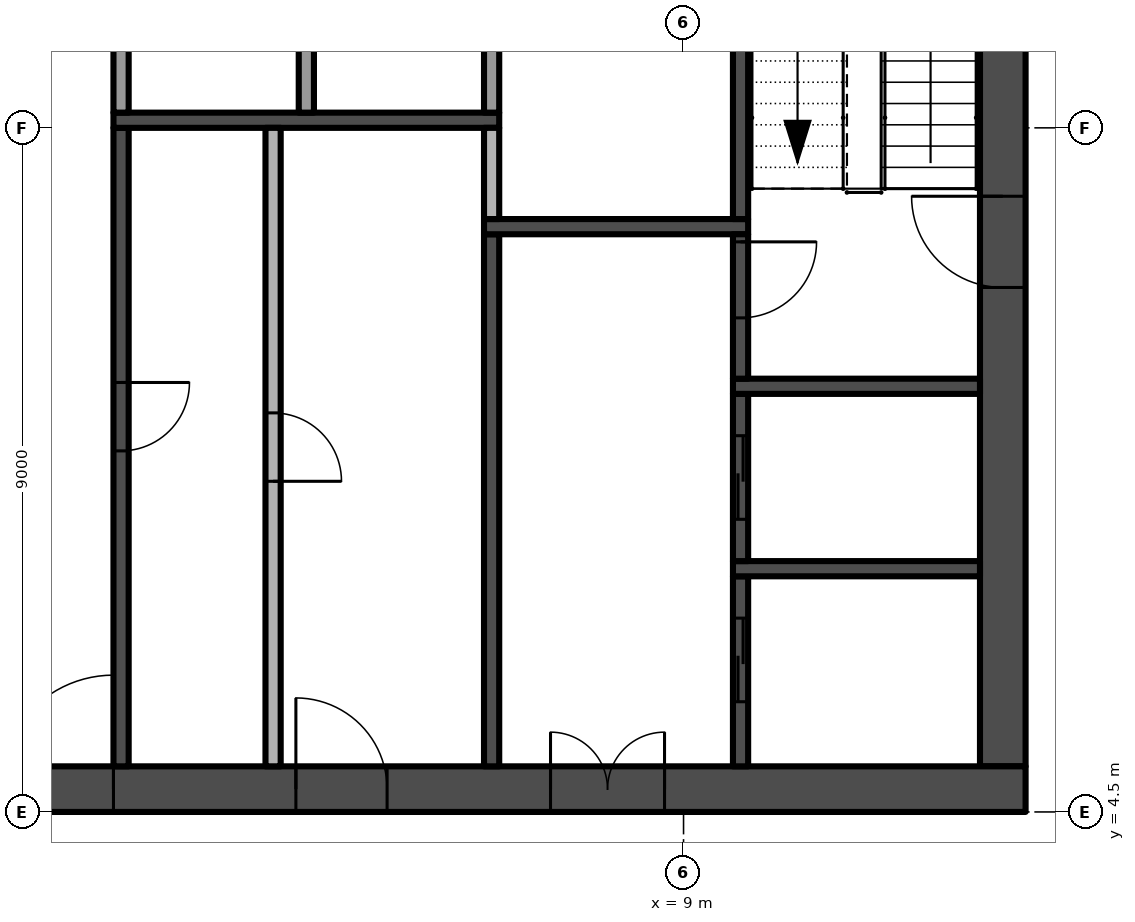
"""IFC4 building model, lengths in metres.
Left out: names, types, materials, properties, quantities, classifications, styles, units other than length and angle.
Written with IfcOpenShell. Run it as: python <this file> out.ifc"""

import sys

from ifc_helpers import new_model, si_unit, direction, frame, frame_2d, origin, place, context, subcontext, project, spatial, rectangle, extrude, element, fill, save


model = new_model("IFC4")
c1 = context("Model", 3, precision=1e-05, world=origin(), true_north=direction((0.0, 1.0)))
c2 = subcontext(c1, "Body", "Model", "MODEL_VIEW")
j1 = project(units=[si_unit("LENGTHUNIT", "METRE"), si_unit("PLANEANGLEUNIT", "RADIAN")], contexts=[c1])
p1 = place(None, origin())
s1 = spatial("IfcSite", under=j1, at=p1, CompositionType="ELEMENT")
p2 = place(p1, origin())
s2 = spatial("IfcBuilding", under=s1, at=p2, CompositionType="ELEMENT")
p3 = place(p2, frame((0.0, 0.0, 203.4)))
s3 = spatial("IfcBuildingStorey", under=s2, at=p3, CompositionType="ELEMENT", Elevation=203.4)
p4 = place(p3, frame((-13.5, 4.8, -0.3), z_axis=(0.0, 0.0, 1.0), x_axis=(1.0, 0.0, 0.0)))
e1 = element("IfcWall", 1, at=p4, inside=s3, PredefinedType="SHEAR", context=c2, shape_type="SweptSolid", body=[
    extrude(rectangle(XDim=27.0, YDim=0.6, at=frame_2d((13.5, 0.0))), origin(), (0.0, 0.0, 1.0), 3.8),
])
p5 = place(p4, frame((12.0, 0.0, 0.3)))
e2 = element("IfcOpeningElement", 2, at=p5, cuts=e1, PredefinedType="OPENING", context=c2, shape_type="SweptSolid", body=[
    extrude(rectangle(XDim=3.0, YDim=2.4, at=frame_2d((1.5, 1.2))), frame((0.0, 0.31, 0.0), z_axis=(0.0, -1.0, 0.0), x_axis=(1.0, 0.0, 0.0)), (0.0, 0.0, 1.0), 0.62),
])
p6 = place(p4, frame((4.9, 0.0, 0.3)))
e3 = element("IfcOpeningElement", 3, at=p6, cuts=e1, PredefinedType="OPENING", context=c2, shape_type="SweptSolid", body=[
    extrude(rectangle(XDim=1.2, YDim=2.2, at=frame_2d((0.6, 1.1))), frame((0.0, 0.31, 0.0), z_axis=(0.0, -1.0, 0.0), x_axis=(1.0, 0.0, 0.0)), (0.0, 0.0, 1.0), 0.62),
])
p7 = place(p4, frame((20.75, 0.0, 0.3)))
e4 = element("IfcOpeningElement", 4, at=p7, cuts=e1, PredefinedType="OPENING", context=c2, shape_type="SweptSolid", body=[
    extrude(rectangle(XDim=1.5, YDim=2.2, at=frame_2d((0.75, 1.1))), frame((0.0, 0.31, 0.0), z_axis=(0.0, -1.0, 0.0), x_axis=(1.0, 0.0, 0.0)), (0.0, 0.0, 1.0), 0.62),
])
p8 = place(p4, frame((17.4, 0.0, 0.3)))
e5 = element("IfcOpeningElement", 5, at=p8, cuts=e1, PredefinedType="OPENING", context=c2, shape_type="SweptSolid", body=[
    extrude(rectangle(XDim=1.2, YDim=2.2, at=frame_2d((0.6, 1.1))), frame((0.0, 0.31, 0.0), z_axis=(0.0, -1.0, 0.0), x_axis=(1.0, 0.0, 0.0)), (0.0, 0.0, 1.0), 0.62),
])
p9 = place(p3, frame((13.2, 5.1, -0.3), z_axis=(0.0, 0.0, 1.0), x_axis=(0.0, 1.0, 0.0)))
e6 = element("IfcWall", 6, at=p9, inside=s3, PredefinedType="SHEAR", context=c2, shape_type="SweptSolid", body=[
    extrude(rectangle(XDim=16.8, YDim=0.6, at=frame_2d((8.4, 0.0))), origin(), (0.0, 0.0, 1.0), 3.8),
])
p10 = place(p9, frame((6.3, 0.0, 0.3)))
e7 = element("IfcOpeningElement", 7, at=p10, cuts=e6, PredefinedType="OPENING", context=c2, shape_type="SweptSolid", body=[
    extrude(rectangle(XDim=1.2, YDim=2.2, at=frame_2d((0.6, 1.1))), frame((0.0, 0.31, 0.0), z_axis=(0.0, -1.0, 0.0), x_axis=(1.0, 0.0, 0.0)), (0.0, 0.0, 1.0), 0.62),
])
p11 = place(p3, frame((1.6, 13.5, 0.0), z_axis=(0.0, 0.0, 1.0), x_axis=(0.0, -1.0, 0.0)))
e8 = element("IfcWall", 8, at=p11, inside=s3, PredefinedType="SHEAR", context=c2, shape_type="SweptSolid", body=[
    extrude(rectangle(XDim=8.4, YDim=0.2, at=frame_2d((4.2, 0.0))), origin(), (0.0, 0.0, 1.0), 3.5),
])
p12 = place(p11, frame((3.35, 0.0, 0.0)))
e9 = element("IfcOpeningElement", 9, at=p12, cuts=e8, PredefinedType="OPENING", context=c2, shape_type="SweptSolid", body=[
    extrude(rectangle(XDim=0.9, YDim=2.1, at=frame_2d((0.45, 1.05))), frame((0.0, 0.11, 0.0), z_axis=(0.0, -1.0, 0.0), x_axis=(1.0, 0.0, 0.0)), (0.0, 0.0, 1.0), 0.22),
])
p13 = place(p3, frame((1.5, 13.6, 0.0), z_axis=(0.0, 0.0, 1.0), x_axis=(1.0, 0.0, 0.0)))
e10 = element("IfcWall", 10, at=p13, inside=s3, PredefinedType="SHEAR", context=c2, shape_type="SweptSolid", body=[
    extrude(rectangle(XDim=5.075, YDim=0.2, at=frame_2d((2.538, 0.0))), origin(), (0.0, 0.0, 1.0), 3.5),
])
p14 = place(p3, frame((1.6, 13.7, 0.0), z_axis=(0.0, 0.0, 1.0), x_axis=(0.0, 1.0, 0.0)))
e11 = element("IfcWall", 11, at=p14, inside=s3, PredefinedType="PARTITIONING", context=c2, shape_type="SweptSolid", body=[
    extrude(rectangle(XDim=2.2, YDim=0.2, at=frame_2d((1.1, 0.0))), origin(), (0.0, 0.0, 1.0), 3.5),
])
p15 = place(p3, frame((3.6, 13.5, 0.0), z_axis=(0.0, 0.0, 1.0), x_axis=(0.0, -1.0, 0.0)))
e12 = element("IfcWall", 12, at=p15, inside=s3, PredefinedType="PARTITIONING", context=c2, shape_type="SweptSolid", body=[
    extrude(rectangle(XDim=8.4, YDim=0.2, at=frame_2d((4.2, 0.0))), origin(), (0.0, 0.0, 1.0), 3.5),
])
p16 = place(p15, frame((3.75, 0.0, 0.0)))
e13 = element("IfcOpeningElement", 13, at=p16, cuts=e12, PredefinedType="OPENING", context=c2, shape_type="SweptSolid", body=[
    extrude(rectangle(XDim=0.9, YDim=2.1, at=frame_2d((0.45, 1.05))), frame((0.0, 0.11, 0.0), z_axis=(0.0, -1.0, 0.0), x_axis=(1.0, 0.0, 0.0)), (0.0, 0.0, 1.0), 0.22),
])
p17 = place(p3, frame((4.037, 13.7, 0.0), z_axis=(0.0, 0.0, 1.0), x_axis=(0.0, 1.0, 0.0)))
e14 = element("IfcWall", 14, at=p17, inside=s3, PredefinedType="PARTITIONING", context=c2, shape_type="SweptSolid", body=[
    extrude(rectangle(XDim=2.2, YDim=0.2, at=frame_2d((1.1, 0.0))), origin(), (0.0, 0.0, 1.0), 3.5),
])
p18 = place(p3, frame((6.475, 5.1, 0.0), z_axis=(0.0, 0.0, 1.0), x_axis=(0.0, 1.0, 0.0)))
e15 = element("IfcWall", 15, at=p18, inside=s3, PredefinedType="SHEAR", context=c2, shape_type="SweptSolid", body=[
    extrude(rectangle(XDim=7.0, YDim=0.2, at=frame_2d((3.5, 0.0))), origin(), (0.0, 0.0, 1.0), 3.5),
])
p19 = place(p3, frame((6.375, 12.2, 0.0), z_axis=(0.0, 0.0, 1.0), x_axis=(1.0, 0.0, 0.0)))
e16 = element("IfcWall", 16, at=p19, inside=s3, PredefinedType="SHEAR", context=c2, shape_type="SweptSolid", body=[
    extrude(rectangle(XDim=3.475, YDim=0.2, at=frame_2d((1.738, 0.0))), origin(), (0.0, 0.0, 1.0), 3.5),
])
p20 = place(p3, frame((6.475, 12.3, 0.0), z_axis=(0.0, 0.0, 1.0), x_axis=(0.0, 1.0, 0.0)))
e17 = element("IfcWall", 17, at=p20, inside=s3, PredefinedType="PARTITIONING", context=c2, shape_type="SweptSolid", body=[
    extrude(rectangle(XDim=1.2, YDim=0.2, at=frame_2d((0.6, 0.0))), origin(), (0.0, 0.0, 1.0), 3.5),
])
p21 = place(p3, frame((6.475, 13.7, 0.0), z_axis=(0.0, 0.0, 1.0), x_axis=(0.0, 1.0, 0.0)))
e18 = element("IfcWall", 18, at=p21, inside=s3, PredefinedType="PARTITIONING", context=c2, shape_type="SweptSolid", body=[
    extrude(rectangle(XDim=2.2, YDim=0.2, at=frame_2d((1.1, 0.0))), origin(), (0.0, 0.0, 1.0), 3.5),
])
p22 = place(p3, frame((9.75, 5.1, 0.0), z_axis=(0.0, 0.0, 1.0), x_axis=(0.0, 1.0, 0.0)))
e19 = element("IfcWall", 19, at=p22, inside=s3, PredefinedType="SHEAR", context=c2, shape_type="SweptSolid", body=[
    extrude(rectangle(XDim=2.5, YDim=0.2, at=frame_2d((1.25, 0.0))), origin(), (0.0, 0.0, 1.0), 3.5),
])
p23 = place(p22, frame((0.85, 0.0, 0.0)))
e20 = element("IfcOpeningElement", 20, at=p23, cuts=e19, PredefinedType="OPENING", context=c2, shape_type="SweptSolid", body=[
    extrude(rectangle(XDim=1.1, YDim=2.1, at=frame_2d((0.55, 1.05))), frame((0.0, 0.11, 0.0), z_axis=(0.0, -1.0, 0.0), x_axis=(1.0, 0.0, 0.0)), (0.0, 0.0, 1.0), 0.22),
])
p24 = place(p3, frame((9.65, 7.7, 0.0), z_axis=(0.0, 0.0, 1.0), x_axis=(1.0, 0.0, 0.0)))
e21 = element("IfcWall", 21, at=p24, inside=s3, PredefinedType="SHEAR", context=c2, shape_type="SweptSolid", body=[
    extrude(rectangle(XDim=3.25, YDim=0.2, at=frame_2d((1.625, 0.0))), origin(), (0.0, 0.0, 1.0), 3.5),
])
p25 = place(p3, frame((9.75, 7.8, 0.0), z_axis=(0.0, 0.0, 1.0), x_axis=(0.0, 1.0, 0.0)))
e22 = element("IfcWall", 22, at=p25, inside=s3, PredefinedType="SHEAR", context=c2, shape_type="SweptSolid", body=[
    extrude(rectangle(XDim=2.2, YDim=0.2, at=frame_2d((1.1, 0.0))), origin(), (0.0, 0.0, 1.0), 3.5),
])
p26 = place(p25, frame((0.55, 0.0, 0.0)))
e23 = element("IfcOpeningElement", 23, at=p26, cuts=e22, PredefinedType="OPENING", context=c2, shape_type="SweptSolid", body=[
    extrude(rectangle(XDim=1.1, YDim=2.1, at=frame_2d((0.55, 1.05))), frame((0.0, 0.11, 0.0), z_axis=(0.0, -1.0, 0.0), x_axis=(1.0, 0.0, 0.0)), (0.0, 0.0, 1.0), 0.22),
])
p27 = place(p3, frame((9.65, 10.1, 0.0), z_axis=(0.0, 0.0, 1.0), x_axis=(1.0, 0.0, 0.0)))
e24 = element("IfcWall", 24, at=p27, inside=s3, PredefinedType="SHEAR", context=c2, shape_type="SweptSolid", body=[
    extrude(rectangle(XDim=3.25, YDim=0.2, at=frame_2d((1.625, 0.0))), origin(), (0.0, 0.0, 1.0), 3.5),
])
p28 = place(p3, frame((9.75, 12.1, 0.0), z_axis=(0.0, 0.0, 1.0), x_axis=(0.0, -1.0, 0.0)))
e25 = element("IfcWall", 25, at=p28, inside=s3, PredefinedType="SHEAR", context=c2, shape_type="SweptSolid", body=[
    extrude(rectangle(XDim=1.9, YDim=0.2, at=frame_2d((0.95, 0.0))), origin(), (0.0, 0.0, 1.0), 3.5),
])
p29 = place(p28, frame((0.1, 0.0, 0.0)))
e26 = element("IfcOpeningElement", 26, at=p29, cuts=e25, PredefinedType="OPENING", context=c2, shape_type="SweptSolid", body=[
    extrude(rectangle(XDim=1.0, YDim=2.2, at=frame_2d((0.5, 1.1))), frame((0.0, 0.11, 0.0), z_axis=(0.0, -1.0, 0.0), x_axis=(1.0, 0.0, 0.0)), (0.0, 0.0, 1.0), 0.22),
])
p30 = place(p3, frame((9.75, 12.3, 0.0), z_axis=(0.0, 0.0, 1.0), x_axis=(0.0, 1.0, 0.0)))
e27 = element("IfcWall", 27, at=p30, inside=s3, PredefinedType="SHEAR", context=c2, shape_type="SweptSolid", body=[
    extrude(rectangle(XDim=3.6, YDim=0.2, at=frame_2d((1.8, 0.0))), origin(), (0.0, 0.0, 1.0), 3.5),
])
p31 = place(p5, frame((3.0, 0.0, 0.0), z_axis=(0.0, 0.0, 1.0), x_axis=(-1.0, 0.0, 0.0)))
e28 = element("IfcDoor", 28, at=p31, inside=s3, OperationType="DOUBLE_DOOR_SINGLE_SWING", PredefinedType="DOOR", context=c2, shape_type="SweptSolid", body=[
    extrude(rectangle(XDim=3.0, YDim=2.4, at=frame_2d((1.5, 1.2))), frame((0.0, 0.025, 0.0), z_axis=(0.0, -1.0, 0.0), x_axis=(1.0, 0.0, 0.0)), (0.0, 0.0, 1.0), 0.05),
])
fill(e2, e28)
p32 = place(p10, frame((1.2, 0.0, 0.0), z_axis=(0.0, 0.0, 1.0), x_axis=(-1.0, 0.0, 0.0)))
e29 = element("IfcDoor", 29, at=p32, inside=s3, OperationType="SINGLE_SWING_LEFT", PredefinedType="DOOR", context=c2, shape_type="SweptSolid", body=[
    extrude(rectangle(XDim=1.2, YDim=2.2, at=frame_2d((0.6, 1.1))), frame((0.0, 0.025, 0.0), z_axis=(0.0, -1.0, 0.0), x_axis=(1.0, 0.0, 0.0)), (0.0, 0.0, 1.0), 0.05),
])
fill(e7, e29)
p33 = place(p7, frame((1.5, 0.0, 0.0), z_axis=(0.0, 0.0, 1.0), x_axis=(-1.0, 0.0, 0.0)))
e30 = element("IfcDoor", 30, at=p33, inside=s3, OperationType="DOUBLE_DOOR_SINGLE_SWING", PredefinedType="DOOR", context=c2, shape_type="SweptSolid", body=[
    extrude(rectangle(XDim=1.5, YDim=2.2, at=frame_2d((0.75, 1.1))), frame((0.0, 0.025, 0.0), z_axis=(0.0, -1.0, 0.0), x_axis=(1.0, 0.0, 0.0)), (0.0, 0.0, 1.0), 0.05),
])
fill(e4, e30)
p34 = place(p8, frame((1.2, 0.0, 0.0), z_axis=(0.0, 0.0, 1.0), x_axis=(-1.0, 0.0, 0.0)))
e31 = element("IfcDoor", 31, at=p34, inside=s3, OperationType="SINGLE_SWING_RIGHT", PredefinedType="DOOR", context=c2, shape_type="SweptSolid", body=[
    extrude(rectangle(XDim=1.2, YDim=2.2, at=frame_2d((0.6, 1.1))), frame((0.0, 0.025, 0.0), z_axis=(0.0, -1.0, 0.0), x_axis=(1.0, 0.0, 0.0)), (0.0, 0.0, 1.0), 0.05),
])
fill(e5, e31)
p35 = place(p29, origin())
e32 = element("IfcDoor", 32, at=p35, inside=s3, OperationType="SINGLE_SWING_LEFT", PredefinedType="DOOR", context=c2, shape_type="SweptSolid", body=[
    extrude(rectangle(XDim=1.0, YDim=2.2, at=frame_2d((0.5, 1.1))), frame((0.0, 0.025, 0.0), z_axis=(0.0, -1.0, 0.0), x_axis=(1.0, 0.0, 0.0)), (0.0, 0.0, 1.0), 0.05),
])
fill(e26, e32)
p36 = place(p23, origin())
e33 = element("IfcDoor", 33, at=p36, inside=s3, OperationType="SLIDING_TO_RIGHT", PredefinedType="DOOR", context=c2, shape_type="SweptSolid", body=[
    extrude(rectangle(XDim=1.1, YDim=2.1, at=frame_2d((0.55, 1.05))), frame((0.0, 0.025, 0.0), z_axis=(0.0, -1.0, 0.0), x_axis=(1.0, 0.0, 0.0)), (0.0, 0.0, 1.0), 0.05),
])
fill(e20, e33)
p37 = place(p26, origin())
e34 = element("IfcDoor", 34, at=p37, inside=s3, OperationType="SLIDING_TO_RIGHT", PredefinedType="DOOR", context=c2, shape_type="SweptSolid", body=[
    extrude(rectangle(XDim=1.1, YDim=2.1, at=frame_2d((0.55, 1.05))), frame((0.0, 0.025, 0.0), z_axis=(0.0, -1.0, 0.0), x_axis=(1.0, 0.0, 0.0)), (0.0, 0.0, 1.0), 0.05),
])
fill(e23, e34)
p38 = place(p12, origin())
e35 = element("IfcDoor", 35, at=p38, inside=s3, OperationType="SINGLE_SWING_LEFT", PredefinedType="DOOR", context=c2, shape_type="SweptSolid", body=[
    extrude(rectangle(XDim=0.9, YDim=2.1, at=frame_2d((0.45, 1.05))), frame((0.0, 0.025, 0.0), z_axis=(0.0, -1.0, 0.0), x_axis=(1.0, 0.0, 0.0)), (0.0, 0.0, 1.0), 0.05),
])
fill(e9, e35)
p39 = place(p16, origin())
e36 = element("IfcDoor", 36, at=p39, inside=s3, OperationType="SINGLE_SWING_RIGHT", PredefinedType="DOOR", context=c2, shape_type="SweptSolid", body=[
    extrude(rectangle(XDim=0.9, YDim=2.1, at=frame_2d((0.45, 1.05))), frame((0.0, 0.025, 0.0), z_axis=(0.0, -1.0, 0.0), x_axis=(1.0, 0.0, 0.0)), (0.0, 0.0, 1.0), 0.05),
])
fill(e13, e36)
save(model, sys.argv[1])
